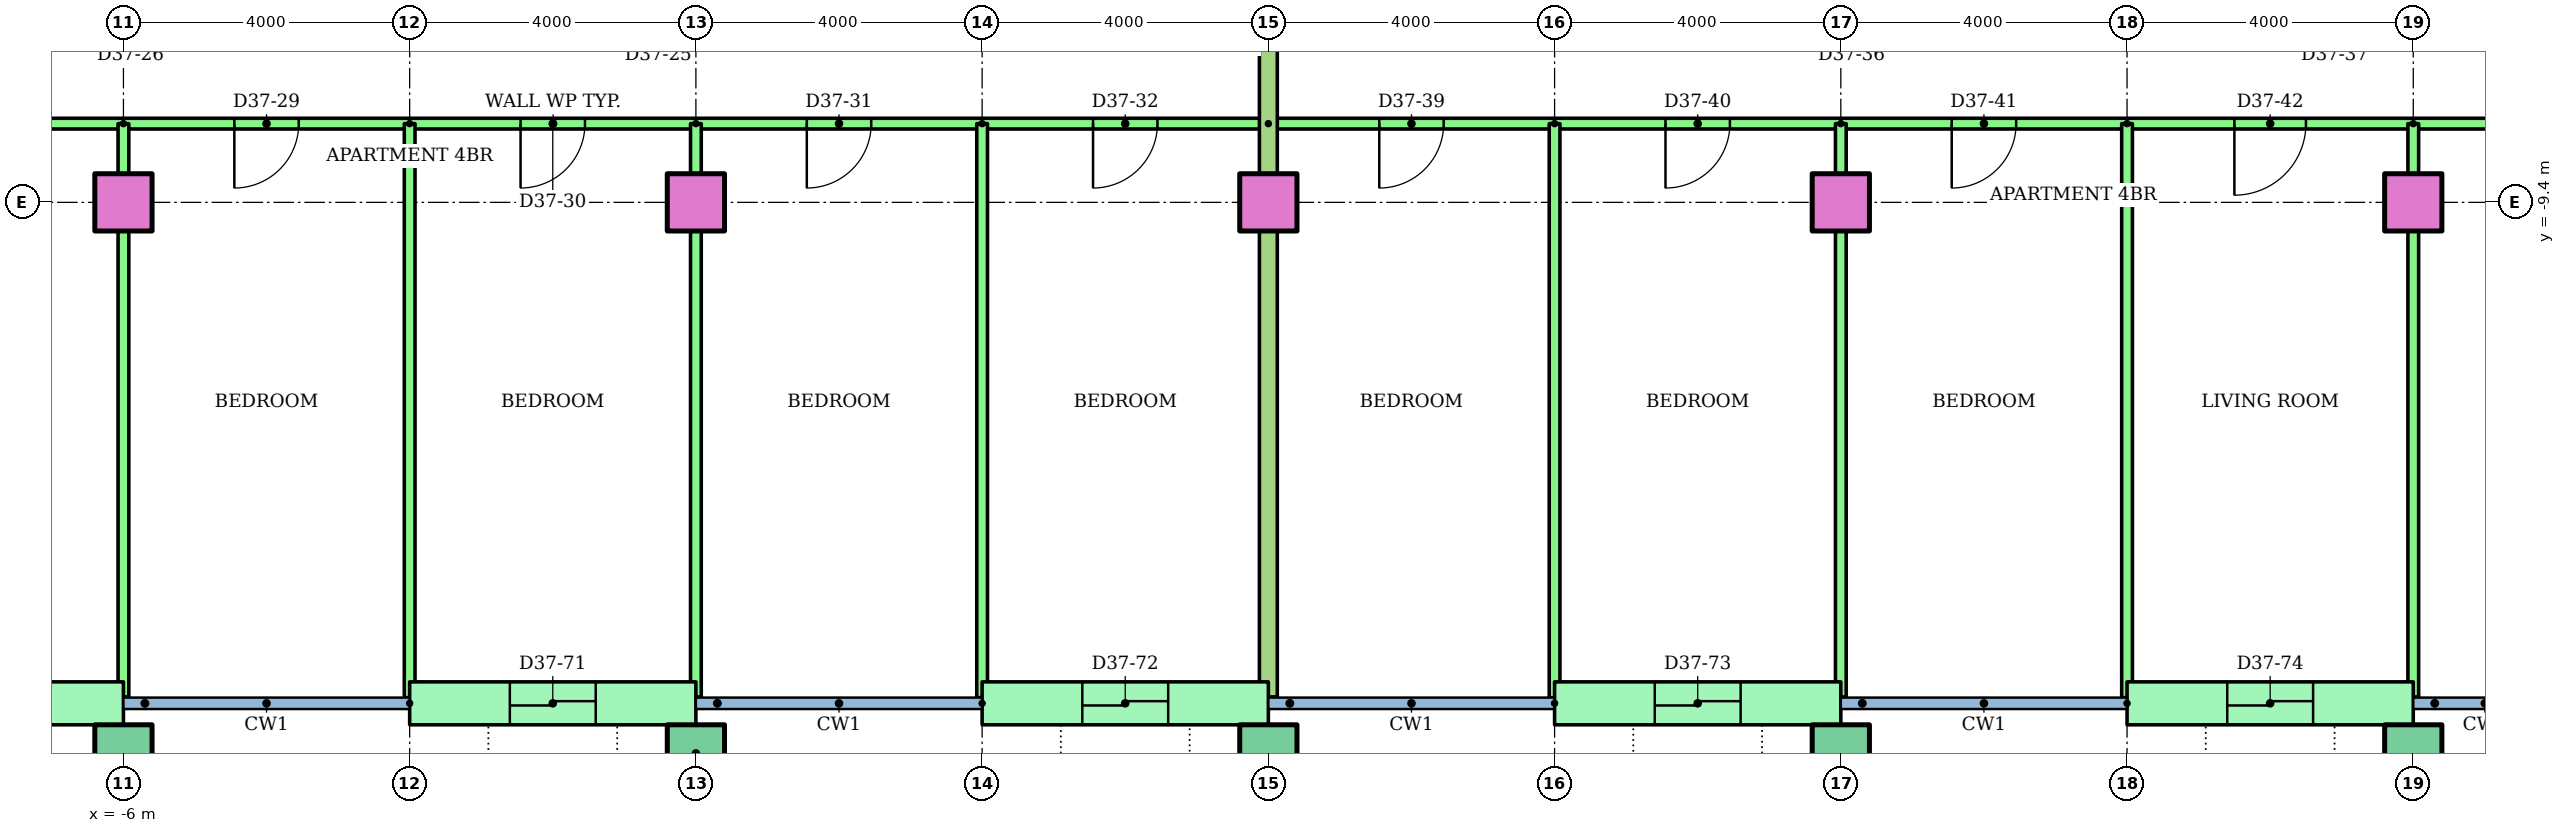
"""IFC4 building model, lengths in metres.
Left out: names, types, materials, properties, quantities, classifications, styles, units other than length and angle.
Written with IfcOpenShell. Run it as: python <this file> out.ifc"""

import sys

from ifc_helpers import new_model, si_unit, direction, frame, frame_2d, origin, origin_2d, place, context, subcontext, project, spatial, rectangle, hollow_rectangle, extrude, element, fill, save


model = new_model("IFC4")
c1 = context("Model", 3, precision=1e-05, world=origin(), true_north=direction((0.0, 1.0)))
c2 = subcontext(c1, "Body", "Model", "MODEL_VIEW")
j1 = project(units=[si_unit("LENGTHUNIT", "METRE"), si_unit("PLANEANGLEUNIT", "RADIAN")], contexts=[c1])
p1 = place(None, origin())
s1 = spatial("IfcSite", under=j1, at=p1, CompositionType="ELEMENT")
p2 = place(p1, origin())
s2 = spatial("IfcBuilding", under=s1, at=p2, CompositionType="ELEMENT")
p3 = place(p2, frame((0.0, 0.0, 142.2)))
s3 = spatial("IfcBuildingStorey", under=s2, at=p3, CompositionType="ELEMENT", Elevation=142.2)
for number, where in (
    (1, (-6.0, -17.1, 0.0)),
    (2, (2.0, -17.1, 0.0)),
    (3, (10.0, -17.1, 0.0)),
    (4, (18.0, -17.1, 0.0)),
    (5, (26.0, -17.1, 0.0)),
):
    element("IfcColumn", number, at=place(p3, frame(where)), inside=s3, PredefinedType="COLUMN", context=c2, shape_type="SweptSolid", body=[
        extrude(hollow_rectangle(XDim=0.8, YDim=0.8, WallThickness=0.04, at=origin_2d()), origin(), (0.0, 0.0, 1.0), 3.2),
    ])
for number, where in (
    (6, (-6.0, -9.4, 0.0)),
    (7, (2.0, -9.4, 0.0)),
    (8, (10.0, -9.4, 0.0)),
    (9, (18.0, -9.4, 0.0)),
    (10, (26.0, -9.4, 0.0)),
):
    element("IfcColumn", number, at=place(p3, frame(where)), inside=s3, PredefinedType="COLUMN", context=c2, shape_type="SweptSolid", body=[
        extrude(rectangle(XDim=0.8, YDim=0.8, at=origin_2d()), origin(), (0.0, 0.0, 1.0), 3.2),
    ])
p4 = place(p3, frame((-10.0, -16.4, 0.0)))
e11 = element("IfcWall", 11, at=p4, inside=s3, PredefinedType="STANDARD", context=c2, shape_type="SweptSolid", body=[
    extrude(rectangle(XDim=4.0, YDim=0.6, at=frame_2d((2.0, 0.0))), origin(), (0.0, 0.0, 1.0), 2.92),
])
p5 = place(p4, frame((1.4, 0.0, 0.0)))
e12 = element("IfcOpeningElement", 12, at=p5, cuts=e11, PredefinedType="OPENING", context=c2, shape_type="SweptSolid", body=[
    extrude(rectangle(XDim=1.2, YDim=2.1, at=frame_2d((0.6, 1.05))), frame((0.0, 0.31, 0.0), z_axis=(0.0, -1.0, 0.0), x_axis=(1.0, 0.0, 0.0)), (0.0, 0.0, 1.0), 0.62),
])
p6 = place(p3, frame((-2.0, -16.4, 0.0)))
e13 = element("IfcWall", 13, at=p6, inside=s3, PredefinedType="STANDARD", context=c2, shape_type="SweptSolid", body=[
    extrude(rectangle(XDim=4.0, YDim=0.6, at=frame_2d((2.0, 0.0))), origin(), (0.0, 0.0, 1.0), 2.92),
])
p7 = place(p6, frame((1.4, 0.0, 0.0)))
e14 = element("IfcOpeningElement", 14, at=p7, cuts=e13, PredefinedType="OPENING", context=c2, shape_type="SweptSolid", body=[
    extrude(rectangle(XDim=1.2, YDim=2.1, at=frame_2d((0.6, 1.05))), frame((0.0, 0.31, 0.0), z_axis=(0.0, -1.0, 0.0), x_axis=(1.0, 0.0, 0.0)), (0.0, 0.0, 1.0), 0.62),
])
p8 = place(p3, frame((6.0, -16.4, 0.0)))
e15 = element("IfcWall", 15, at=p8, inside=s3, PredefinedType="STANDARD", context=c2, shape_type="SweptSolid", body=[
    extrude(rectangle(XDim=4.0, YDim=0.6, at=frame_2d((2.0, 0.0))), origin(), (0.0, 0.0, 1.0), 2.92),
])
p9 = place(p8, frame((1.4, 0.0, 0.0)))
e16 = element("IfcOpeningElement", 16, at=p9, cuts=e15, PredefinedType="OPENING", context=c2, shape_type="SweptSolid", body=[
    extrude(rectangle(XDim=1.2, YDim=2.1, at=frame_2d((0.6, 1.05))), frame((0.0, 0.31, 0.0), z_axis=(0.0, -1.0, 0.0), x_axis=(1.0, 0.0, 0.0)), (0.0, 0.0, 1.0), 0.62),
])
p10 = place(p3, frame((14.0, -16.4, 0.0)))
e17 = element("IfcWall", 17, at=p10, inside=s3, PredefinedType="STANDARD", context=c2, shape_type="SweptSolid", body=[
    extrude(rectangle(XDim=4.0, YDim=0.6, at=frame_2d((2.0, 0.0))), origin(), (0.0, 0.0, 1.0), 2.92),
])
p11 = place(p10, frame((1.4, 0.0, 0.0)))
e18 = element("IfcOpeningElement", 18, at=p11, cuts=e17, PredefinedType="OPENING", context=c2, shape_type="SweptSolid", body=[
    extrude(rectangle(XDim=1.2, YDim=2.1, at=frame_2d((0.6, 1.05))), frame((0.0, 0.31, 0.0), z_axis=(0.0, -1.0, 0.0), x_axis=(1.0, 0.0, 0.0)), (0.0, 0.0, 1.0), 0.62),
])
p12 = place(p3, frame((22.0, -16.4, 0.0)))
e19 = element("IfcWall", 19, at=p12, inside=s3, PredefinedType="STANDARD", context=c2, shape_type="SweptSolid", body=[
    extrude(rectangle(XDim=4.0, YDim=0.6, at=frame_2d((2.0, 0.0))), origin(), (0.0, 0.0, 1.0), 2.92),
])
p13 = place(p12, frame((1.4, 0.0, 0.0)))
e20 = element("IfcOpeningElement", 20, at=p13, cuts=e19, PredefinedType="OPENING", context=c2, shape_type="SweptSolid", body=[
    extrude(rectangle(XDim=1.2, YDim=2.1, at=frame_2d((0.6, 1.05))), frame((0.0, 0.31, 0.0), z_axis=(0.0, -1.0, 0.0), x_axis=(1.0, 0.0, 0.0)), (0.0, 0.0, 1.0), 0.62),
])
p14 = place(p3, frame((10.0, -8.3, 0.0), z_axis=(0.0, 0.0, 1.0), x_axis=(-1.0, 0.0, 0.0)))
e21 = element("IfcWall", 21, at=p14, inside=s3, PredefinedType="PARTITIONING", context=c2, shape_type="SweptSolid", body=[
    extrude(rectangle(XDim=24.0, YDim=0.15, at=frame_2d((12.0, 0.0))), origin(), (0.0, 0.0, 1.0), 2.4),
])
p15 = place(p14, frame((19.5, 0.0, 0.0)))
e22 = element("IfcOpeningElement", 22, at=p15, cuts=e21, PredefinedType="OPENING", context=c2, shape_type="SweptSolid", body=[
    extrude(rectangle(XDim=1.0, YDim=2.1, at=frame_2d((0.5, 1.05))), frame((0.0, 0.085, 0.0), z_axis=(0.0, -1.0, 0.0), x_axis=(1.0, 0.0, 0.0)), (0.0, 0.0, 1.0), 0.17),
])
p16 = place(p14, frame((13.55, 0.0, 0.0)))
e23 = element("IfcOpeningElement", 23, at=p16, cuts=e21, PredefinedType="OPENING", context=c2, shape_type="SweptSolid", body=[
    extrude(rectangle(XDim=0.9, YDim=2.1, at=frame_2d((0.45, 1.05))), frame((0.0, 0.085, 0.0), z_axis=(0.0, -1.0, 0.0), x_axis=(1.0, 0.0, 0.0)), (0.0, 0.0, 1.0), 0.17),
])
p17 = place(p14, frame((9.55, 0.0, 0.0)))
e24 = element("IfcOpeningElement", 24, at=p17, cuts=e21, PredefinedType="OPENING", context=c2, shape_type="SweptSolid", body=[
    extrude(rectangle(XDim=0.9, YDim=2.1, at=frame_2d((0.45, 1.05))), frame((0.0, 0.085, 0.0), z_axis=(0.0, -1.0, 0.0), x_axis=(1.0, 0.0, 0.0)), (0.0, 0.0, 1.0), 0.17),
])
p18 = place(p14, frame((5.55, 0.0, 0.0)))
e25 = element("IfcOpeningElement", 25, at=p18, cuts=e21, PredefinedType="OPENING", context=c2, shape_type="SweptSolid", body=[
    extrude(rectangle(XDim=0.9, YDim=2.1, at=frame_2d((0.45, 1.05))), frame((0.0, 0.085, 0.0), z_axis=(0.0, -1.0, 0.0), x_axis=(1.0, 0.0, 0.0)), (0.0, 0.0, 1.0), 0.17),
])
p19 = place(p14, frame((1.55, 0.0, 0.0)))
e26 = element("IfcOpeningElement", 26, at=p19, cuts=e21, PredefinedType="OPENING", context=c2, shape_type="SweptSolid", body=[
    extrude(rectangle(XDim=0.9, YDim=2.1, at=frame_2d((0.45, 1.05))), frame((0.0, 0.085, 0.0), z_axis=(0.0, -1.0, 0.0), x_axis=(1.0, 0.0, 0.0)), (0.0, 0.0, 1.0), 0.17),
])
p20 = place(p3, frame((-6.0, -8.3, 0.0), z_axis=(0.0, 0.0, 1.0), x_axis=(0.0, -1.0, 0.0)))
e27 = element("IfcWall", 27, at=p20, inside=s3, PredefinedType="PARTITIONING", context=c2, shape_type="SweptSolid", body=[
    extrude(rectangle(XDim=8.01, YDim=0.15, at=frame_2d((4.005, 0.0))), origin(), (0.0, 0.0, 1.0), 2.4),
])
p21 = place(p3, frame((-2.0, -8.3, 0.0), z_axis=(0.0, 0.0, 1.0), x_axis=(0.0, -1.0, 0.0)))
e28 = element("IfcWall", 28, at=p21, inside=s3, PredefinedType="PARTITIONING", context=c2, shape_type="SweptSolid", body=[
    extrude(rectangle(XDim=8.021, YDim=0.15, at=frame_2d((4.01, 0.0))), origin(), (0.0, 0.0, 1.0), 2.4),
])
p22 = place(p3, frame((2.0, -8.3, 0.0), z_axis=(0.0, 0.0, 1.0), x_axis=(0.0, -1.0, 0.0)))
e29 = element("IfcWall", 29, at=p22, inside=s3, PredefinedType="PARTITIONING", context=c2, shape_type="SweptSolid", body=[
    extrude(rectangle(XDim=8.01, YDim=0.15, at=frame_2d((4.005, 0.0))), origin(), (0.0, 0.0, 1.0), 2.4),
])
p23 = place(p3, frame((6.0, -8.3, 0.0), z_axis=(0.0, 0.0, 1.0), x_axis=(0.0, -1.0, 0.0)))
e30 = element("IfcWall", 30, at=p23, inside=s3, PredefinedType="PARTITIONING", context=c2, shape_type="SweptSolid", body=[
    extrude(rectangle(XDim=8.021, YDim=0.15, at=frame_2d((4.01, 0.0))), origin(), (0.0, 0.0, 1.0), 2.4),
])
p24 = place(p3, frame((32.72, -8.3, 0.0), z_axis=(0.0, 0.0, 1.0), x_axis=(-1.0, 0.0, 0.0)))
e31 = element("IfcWall", 31, at=p24, inside=s3, PredefinedType="PARTITIONING", context=c2, shape_type="SweptSolid", body=[
    extrude(rectangle(XDim=22.72, YDim=0.15, at=frame_2d((11.36, 0.0))), origin(), (0.0, 0.0, 1.0), 2.4),
])
p25 = place(p24, frame((20.27, 0.0, 0.0)))
e32 = element("IfcOpeningElement", 32, at=p25, cuts=e31, PredefinedType="OPENING", context=c2, shape_type="SweptSolid", body=[
    extrude(rectangle(XDim=0.9, YDim=2.1, at=frame_2d((0.45, 1.05))), frame((0.0, 0.085, 0.0), z_axis=(0.0, -1.0, 0.0), x_axis=(1.0, 0.0, 0.0)), (0.0, 0.0, 1.0), 0.17),
])
p26 = place(p24, frame((16.27, 0.0, 0.0)))
e33 = element("IfcOpeningElement", 33, at=p26, cuts=e31, PredefinedType="OPENING", context=c2, shape_type="SweptSolid", body=[
    extrude(rectangle(XDim=0.9, YDim=2.1, at=frame_2d((0.45, 1.05))), frame((0.0, 0.085, 0.0), z_axis=(0.0, -1.0, 0.0), x_axis=(1.0, 0.0, 0.0)), (0.0, 0.0, 1.0), 0.17),
])
p27 = place(p24, frame((12.27, 0.0, 0.0)))
e34 = element("IfcOpeningElement", 34, at=p27, cuts=e31, PredefinedType="OPENING", context=c2, shape_type="SweptSolid", body=[
    extrude(rectangle(XDim=0.9, YDim=2.1, at=frame_2d((0.45, 1.05))), frame((0.0, 0.085, 0.0), z_axis=(0.0, -1.0, 0.0), x_axis=(1.0, 0.0, 0.0)), (0.0, 0.0, 1.0), 0.17),
])
p28 = place(p24, frame((8.22, 0.0, 0.0)))
e35 = element("IfcOpeningElement", 35, at=p28, cuts=e31, PredefinedType="OPENING", context=c2, shape_type="SweptSolid", body=[
    extrude(rectangle(XDim=1.0, YDim=2.1, at=frame_2d((0.5, 1.05))), frame((0.0, 0.085, 0.0), z_axis=(0.0, -1.0, 0.0), x_axis=(1.0, 0.0, 0.0)), (0.0, 0.0, 1.0), 0.17),
])
p29 = place(p24, frame((3.02, 0.0, 0.0)))
e36 = element("IfcOpeningElement", 36, at=p29, cuts=e31, PredefinedType="OPENING", context=c2, shape_type="SweptSolid", body=[
    extrude(rectangle(XDim=0.9, YDim=2.1, at=frame_2d((0.45, 1.05))), frame((0.0, 0.085, 0.0), z_axis=(0.0, -1.0, 0.0), x_axis=(1.0, 0.0, 0.0)), (0.0, 0.0, 1.0), 0.17),
])
p30 = place(p3, frame((14.0, -8.3, 0.0), z_axis=(0.0, 0.0, 1.0), x_axis=(0.0, -1.0, 0.0)))
e37 = element("IfcWall", 37, at=p30, inside=s3, PredefinedType="PARTITIONING", context=c2, shape_type="SweptSolid", body=[
    extrude(rectangle(XDim=8.021, YDim=0.15, at=frame_2d((4.01, 0.0))), origin(), (0.0, 0.0, 1.0), 2.4),
])
p31 = place(p3, frame((18.0, -8.3, 0.0), z_axis=(0.0, 0.0, 1.0), x_axis=(0.0, -1.0, 0.0)))
e38 = element("IfcWall", 38, at=p31, inside=s3, PredefinedType="PARTITIONING", context=c2, shape_type="SweptSolid", body=[
    extrude(rectangle(XDim=8.01, YDim=0.15, at=frame_2d((4.005, 0.0))), origin(), (0.0, 0.0, 1.0), 2.4),
])
p32 = place(p3, frame((22.0, -8.3, 0.0), z_axis=(0.0, 0.0, 1.0), x_axis=(0.0, -1.0, 0.0)))
e39 = element("IfcWall", 39, at=p32, inside=s3, PredefinedType="PARTITIONING", context=c2, shape_type="SweptSolid", body=[
    extrude(rectangle(XDim=8.021, YDim=0.15, at=frame_2d((4.01, 0.0))), origin(), (0.0, 0.0, 1.0), 2.4),
])
p33 = place(p3, frame((26.0, -8.3, 0.0), z_axis=(0.0, 0.0, 1.0), x_axis=(0.0, -1.0, 0.0)))
e40 = element("IfcWall", 40, at=p33, inside=s3, PredefinedType="PARTITIONING", context=c2, shape_type="SweptSolid", body=[
    extrude(rectangle(XDim=8.01, YDim=0.15, at=frame_2d((4.005, 0.0))), origin(), (0.0, 0.0, 1.0), 2.4),
])
p34 = place(p3, frame((10.0, -1.4, 0.0), z_axis=(0.0, 0.0, 1.0), x_axis=(0.0, -1.0, 0.0)))
e41 = element("IfcWall", 41, at=p34, inside=s3, PredefinedType="PARTITIONING", context=c2, shape_type="SweptSolid", body=[
    extrude(rectangle(XDim=14.91, YDim=0.25, at=frame_2d((7.455, 0.0))), origin(), (0.0, 0.0, 1.0), 2.4),
])
p35 = place(p16, origin())
e42 = element("IfcDoor", 42, at=p35, inside=s3, OperationType="SINGLE_SWING_RIGHT", PredefinedType="DOOR", context=c2, shape_type="SweptSolid", body=[
    extrude(rectangle(XDim=0.9, YDim=2.1, at=frame_2d((0.45, 1.05))), frame((0.0, 0.025, 0.0), z_axis=(0.0, -1.0, 0.0), x_axis=(1.0, 0.0, 0.0)), (0.0, 0.0, 1.0), 0.05),
])
fill(e23, e42)
p36 = place(p17, origin())
e43 = element("IfcDoor", 43, at=p36, inside=s3, OperationType="SINGLE_SWING_RIGHT", PredefinedType="DOOR", context=c2, shape_type="SweptSolid", body=[
    extrude(rectangle(XDim=0.9, YDim=2.1, at=frame_2d((0.45, 1.05))), frame((0.0, 0.025, 0.0), z_axis=(0.0, -1.0, 0.0), x_axis=(1.0, 0.0, 0.0)), (0.0, 0.0, 1.0), 0.05),
])
fill(e24, e43)
p37 = place(p18, origin())
e44 = element("IfcDoor", 44, at=p37, inside=s3, OperationType="SINGLE_SWING_RIGHT", PredefinedType="DOOR", context=c2, shape_type="SweptSolid", body=[
    extrude(rectangle(XDim=0.9, YDim=2.1, at=frame_2d((0.45, 1.05))), frame((0.0, 0.025, 0.0), z_axis=(0.0, -1.0, 0.0), x_axis=(1.0, 0.0, 0.0)), (0.0, 0.0, 1.0), 0.05),
])
fill(e25, e44)
p38 = place(p19, origin())
e45 = element("IfcDoor", 45, at=p38, inside=s3, OperationType="SINGLE_SWING_RIGHT", PredefinedType="DOOR", context=c2, shape_type="SweptSolid", body=[
    extrude(rectangle(XDim=0.9, YDim=2.1, at=frame_2d((0.45, 1.05))), frame((0.0, 0.025, 0.0), z_axis=(0.0, -1.0, 0.0), x_axis=(1.0, 0.0, 0.0)), (0.0, 0.0, 1.0), 0.05),
])
fill(e26, e45)
p39 = place(p25, origin())
e46 = element("IfcDoor", 46, at=p39, inside=s3, OperationType="SINGLE_SWING_RIGHT", PredefinedType="DOOR", context=c2, shape_type="SweptSolid", body=[
    extrude(rectangle(XDim=0.9, YDim=2.1, at=frame_2d((0.45, 1.05))), frame((0.0, 0.025, 0.0), z_axis=(0.0, -1.0, 0.0), x_axis=(1.0, 0.0, 0.0)), (0.0, 0.0, 1.0), 0.05),
])
fill(e32, e46)
p40 = place(p26, origin())
e47 = element("IfcDoor", 47, at=p40, inside=s3, OperationType="SINGLE_SWING_RIGHT", PredefinedType="DOOR", context=c2, shape_type="SweptSolid", body=[
    extrude(rectangle(XDim=0.9, YDim=2.1, at=frame_2d((0.45, 1.05))), frame((0.0, 0.025, 0.0), z_axis=(0.0, -1.0, 0.0), x_axis=(1.0, 0.0, 0.0)), (0.0, 0.0, 1.0), 0.05),
])
fill(e33, e47)
p41 = place(p27, origin())
e48 = element("IfcDoor", 48, at=p41, inside=s3, OperationType="SINGLE_SWING_RIGHT", PredefinedType="DOOR", context=c2, shape_type="SweptSolid", body=[
    extrude(rectangle(XDim=0.9, YDim=2.1, at=frame_2d((0.45, 1.05))), frame((0.0, 0.025, 0.0), z_axis=(0.0, -1.0, 0.0), x_axis=(1.0, 0.0, 0.0)), (0.0, 0.0, 1.0), 0.05),
])
fill(e34, e48)
p42 = place(p28, origin())
e49 = element("IfcDoor", 49, at=p42, inside=s3, OperationType="SINGLE_SWING_RIGHT", PredefinedType="DOOR", context=c2, shape_type="SweptSolid", body=[
    extrude(rectangle(XDim=1.0, YDim=2.1, at=frame_2d((0.5, 1.05))), frame((0.0, 0.025, 0.0), z_axis=(0.0, -1.0, 0.0), x_axis=(1.0, 0.0, 0.0)), (0.0, 0.0, 1.0), 0.05),
])
fill(e35, e49)
p43 = place(p7, origin())
e50 = element("IfcDoor", 50, at=p43, inside=s3, OperationType="SLIDING_TO_LEFT", PredefinedType="DOOR", context=c2, shape_type="SweptSolid", body=[
    extrude(rectangle(XDim=1.2, YDim=2.1, at=frame_2d((0.6, 1.05))), frame((0.0, 0.025, 0.0), z_axis=(0.0, -1.0, 0.0), x_axis=(1.0, 0.0, 0.0)), (0.0, 0.0, 1.0), 0.05),
])
fill(e14, e50)
p44 = place(p9, origin())
e51 = element("IfcDoor", 51, at=p44, inside=s3, OperationType="SLIDING_TO_LEFT", PredefinedType="DOOR", context=c2, shape_type="SweptSolid", body=[
    extrude(rectangle(XDim=1.2, YDim=2.1, at=frame_2d((0.6, 1.05))), frame((0.0, 0.025, 0.0), z_axis=(0.0, -1.0, 0.0), x_axis=(1.0, 0.0, 0.0)), (0.0, 0.0, 1.0), 0.05),
])
fill(e16, e51)
p45 = place(p11, origin())
e52 = element("IfcDoor", 52, at=p45, inside=s3, OperationType="SLIDING_TO_LEFT", PredefinedType="DOOR", context=c2, shape_type="SweptSolid", body=[
    extrude(rectangle(XDim=1.2, YDim=2.1, at=frame_2d((0.6, 1.05))), frame((0.0, 0.025, 0.0), z_axis=(0.0, -1.0, 0.0), x_axis=(1.0, 0.0, 0.0)), (0.0, 0.0, 1.0), 0.05),
])
fill(e18, e52)
p46 = place(p13, origin())
e53 = element("IfcDoor", 53, at=p46, inside=s3, OperationType="SLIDING_TO_LEFT", PredefinedType="DOOR", context=c2, shape_type="SweptSolid", body=[
    extrude(rectangle(XDim=1.2, YDim=2.1, at=frame_2d((0.6, 1.05))), frame((0.0, 0.025, 0.0), z_axis=(0.0, -1.0, 0.0), x_axis=(1.0, 0.0, 0.0)), (0.0, 0.0, 1.0), 0.05),
])
fill(e20, e53)
save(model, sys.argv[1])
